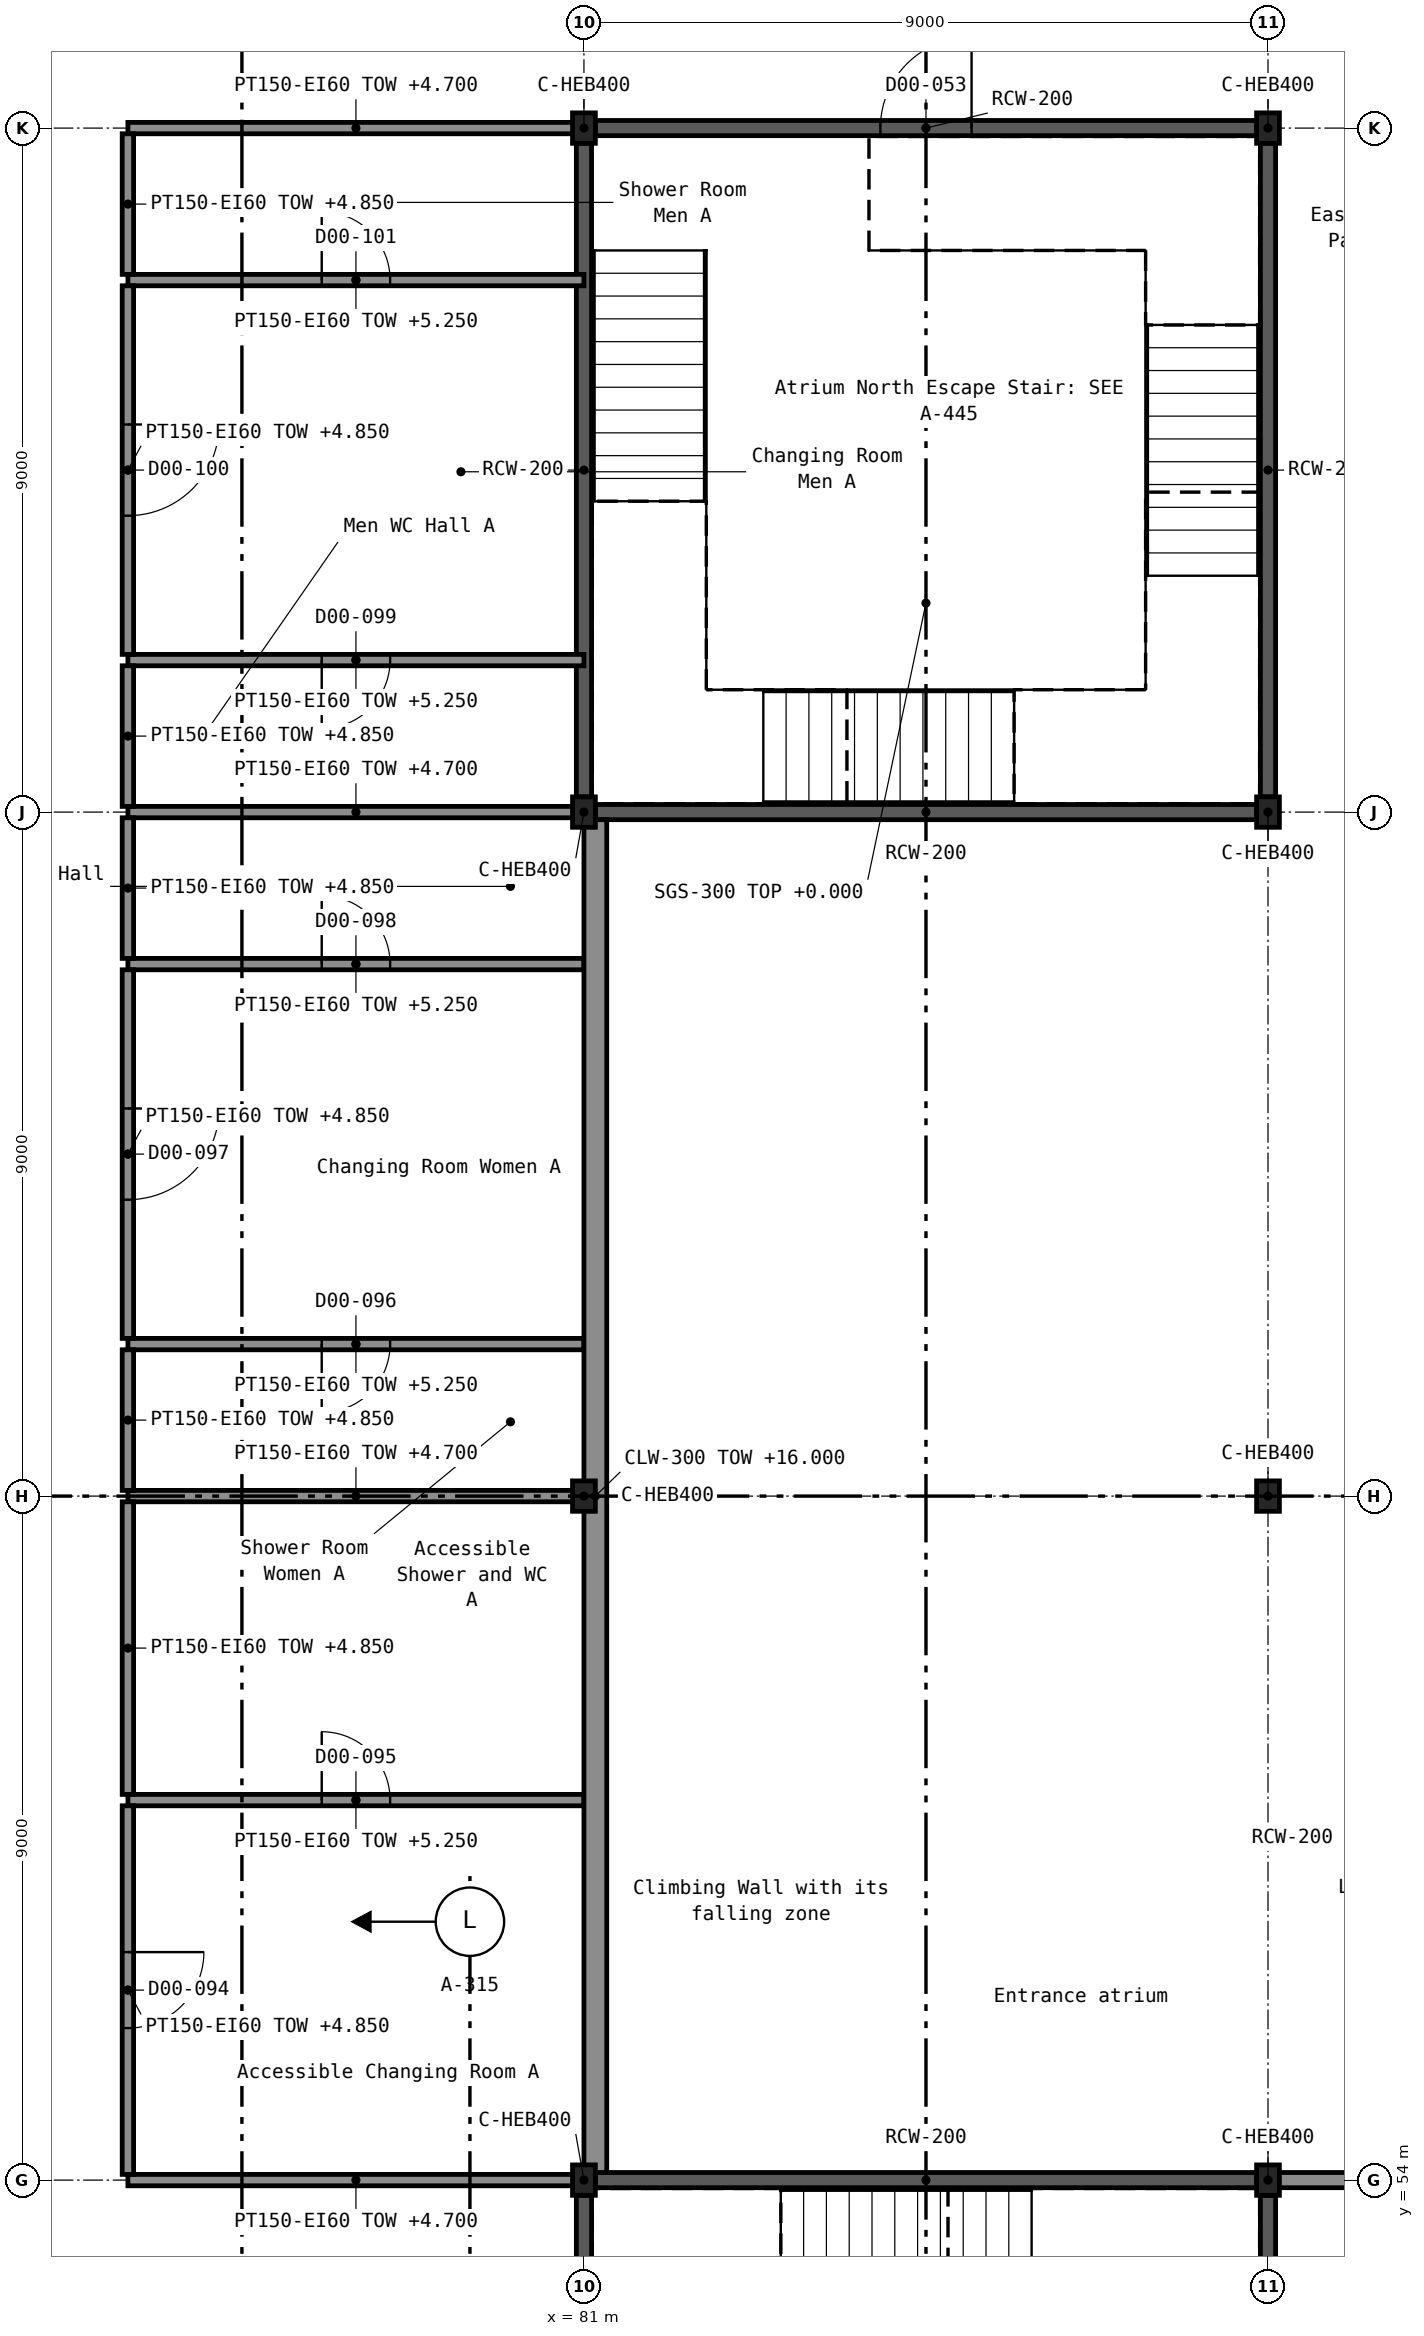
"""IFC4 building model, lengths in metres.
Left out: names, types, materials, properties, quantities, classifications, styles, units other than length and angle.
Written with IfcOpenShell. Run it as: python <this file> out.ifc"""

import sys

from ifc_helpers import new_model, si_unit, direction, frame, frame_2d, origin, origin_2d, place, context, subcontext, project, spatial, rectangle, i_section, extrude, element, fill, save


model = new_model("IFC4")
c1 = context("Model", 3, precision=1e-05, world=origin(), true_north=direction((0.0, 1.0)))
c2 = subcontext(c1, "Body", "Model", "MODEL_VIEW")
j1 = project(units=[si_unit("LENGTHUNIT", "METRE"), si_unit("PLANEANGLEUNIT", "RADIAN")], contexts=[c1])
p1 = place(None, origin())
s1 = spatial("IfcSite", under=j1, at=p1, CompositionType="ELEMENT")
p2 = place(p1, origin())
s2 = spatial("IfcBuilding", under=s1, at=p2, CompositionType="ELEMENT")
p3 = place(p2, origin())
s3 = spatial("IfcBuildingStorey", under=s2, at=p3, CompositionType="ELEMENT", Elevation=0.0)
for number, where, z_axis, x_axis in (
    (1, (81.0, 54.0, -0.3), (0.0, 0.0, 1.0), (1.0, 0.0, 0.0)),
    (2, (90.0, 54.0, -0.3), (0.0, 0.0, 1.0), (1.0, 0.0, 0.0)),
    (3, (81.0, 63.0, -0.3), (0.0, 0.0, 1.0), (1.0, 0.0, 0.0)),
    (4, (90.0, 63.0, -0.3), (0.0, 0.0, 1.0), (1.0, 0.0, 0.0)),
    (5, (81.0, 72.0, -0.3), (0.0, 0.0, 1.0), (1.0, 0.0, 0.0)),
    (6, (90.0, 72.0, -0.3), (0.0, 0.0, 1.0), (1.0, 0.0, 0.0)),
    (7, (81.0, 81.0, -0.3), (0.0, 0.0, 1.0), (1.0, 0.0, 0.0)),
    (8, (90.0, 81.0, -0.3), (0.0, 0.0, 1.0), (1.0, 0.0, 0.0)),
):
    element("IfcColumn", number, at=place(p3, frame(where, z_axis=z_axis, x_axis=x_axis)), inside=s3, PredefinedType="COLUMN", context=c2, shape_type="SweptSolid", body=[
        extrude(i_section(OverallWidth=0.3, OverallDepth=0.4, WebThickness=0.013, FlangeThickness=0.024, FilletRadius=0.027, at=origin_2d()), origin(), (0.0, 0.0, 1.0), 5.7),
    ])
p4 = place(p3, frame((81.15, 54.0, 0.0), z_axis=(0.0, 0.0, 1.0), x_axis=(1.0, 0.0, 0.0)))
e9 = element("IfcWall", 9, at=p4, inside=s3, PredefinedType="SHEAR", context=c2, shape_type="SweptSolid", body=[
    extrude(rectangle(XDim=8.7, YDim=0.2, at=frame_2d((4.35, 0.0))), origin(), (0.0, 0.0, 1.0), 5.4),
])
p5 = place(p3, frame((81.0, 45.2, 0.0), z_axis=(0.0, 0.0, 1.0), x_axis=(0.0, 1.0, 0.0)))
e10 = element("IfcWall", 10, at=p5, inside=s3, PredefinedType="SHEAR", context=c2, shape_type="SweptSolid", body=[
    extrude(rectangle(XDim=8.6, YDim=0.2, at=frame_2d((4.3, 0.0))), origin(), (0.0, 0.0, 1.0), 5.4),
])
p6 = place(p5, frame((3.7, 0.0, 0.0)))
e11 = element("IfcOpeningElement", 11, at=p6, cuts=e10, PredefinedType="OPENING", context=c2, shape_type="SweptSolid", body=[
    extrude(rectangle(XDim=1.2, YDim=2.1, at=frame_2d((0.6, 1.05))), frame((0.0, 0.111, 0.0), z_axis=(0.0, -1.0, 0.0), x_axis=(1.0, 0.0, 0.0)), (0.0, 0.0, 1.0), 0.222),
])
p7 = place(p3, frame((90.0, 45.2, 0.0), z_axis=(0.0, 0.0, 1.0), x_axis=(0.0, 1.0, 0.0)))
e12 = element("IfcWall", 12, at=p7, inside=s3, PredefinedType="SHEAR", context=c2, shape_type="SweptSolid", body=[
    extrude(rectangle(XDim=8.6, YDim=0.2, at=frame_2d((4.3, 0.0))), origin(), (0.0, 0.0, 1.0), 5.4),
])
p8 = place(p3, frame((81.15, 72.0, 0.0), z_axis=(0.0, 0.0, 1.0), x_axis=(1.0, 0.0, 0.0)))
e13 = element("IfcWall", 13, at=p8, inside=s3, PredefinedType="SHEAR", context=c2, shape_type="SweptSolid", body=[
    extrude(rectangle(XDim=8.7, YDim=0.2, at=frame_2d((4.35, 0.0))), origin(), (0.0, 0.0, 1.0), 5.4),
])
p9 = place(p3, frame((81.15, 81.0, 0.0), z_axis=(0.0, 0.0, 1.0), x_axis=(1.0, 0.0, 0.0)))
e14 = element("IfcWall", 14, at=p9, inside=s3, PredefinedType="SHEAR", context=c2, shape_type="SweptSolid", body=[
    extrude(rectangle(XDim=8.7, YDim=0.2, at=frame_2d((4.35, 0.0))), origin(), (0.0, 0.0, 1.0), 5.4),
])
p10 = place(p9, frame((3.75, 0.0, 0.0)))
e15 = element("IfcOpeningElement", 15, at=p10, cuts=e14, PredefinedType="OPENING", context=c2, shape_type="SweptSolid", body=[
    extrude(rectangle(XDim=1.2, YDim=2.1, at=frame_2d((0.6, 1.05))), frame((0.0, 0.111, 0.0), z_axis=(0.0, -1.0, 0.0), x_axis=(1.0, 0.0, 0.0)), (0.0, 0.0, 1.0), 0.222),
])
for number, where, z_axis, x_axis in (
    (16, (81.0, 72.2, 0.0), (0.0, 0.0, 1.0), (0.0, 1.0, 0.0)),
    (17, (90.0, 72.2, 0.0), (0.0, 0.0, 1.0), (0.0, 1.0, 0.0)),
):
    element("IfcWall", number, at=place(p3, frame(where, z_axis=z_axis, x_axis=x_axis)), inside=s3, PredefinedType="SHEAR", context=c2, shape_type="SweptSolid", body=[
        extrude(rectangle(XDim=8.6, YDim=0.2, at=frame_2d((4.3, 0.0))), origin(), (0.0, 0.0, 1.0), 5.4),
    ])
p11 = place(p3, frame((90.0, 54.0, 0.0), z_axis=(0.0, 0.0, 1.0), x_axis=(1.0, 0.0, 0.0)))
e18 = element("IfcWall", 18, at=p11, inside=s3, PredefinedType="SOLIDWALL", context=c2, shape_type="SweptSolid", body=[
    extrude(rectangle(XDim=5.4, YDim=0.2, at=frame_2d((2.7, 0.0))), origin(), (0.0, 0.0, 1.0), 4.7),
])
p12 = place(p3, frame((75.0, 54.0, 0.0), z_axis=(0.0, 0.0, 1.0), x_axis=(1.0, 0.0, 0.0)))
e19 = element("IfcWall", 19, at=p12, inside=s3, PredefinedType="PARTITIONING", context=c2, shape_type="SweptSolid", body=[
    extrude(rectangle(XDim=6.0, YDim=0.15, at=frame_2d((3.0, 0.0))), origin(), (0.0, 0.0, 1.0), 4.7),
])
p13 = place(p3, frame((75.0, 59.0, 0.0), z_axis=(0.0, 0.0, 1.0), x_axis=(1.0, 0.0, 0.0)))
e20 = element("IfcWall", 20, at=p13, inside=s3, PredefinedType="PARTITIONING", context=c2, shape_type="SweptSolid", body=[
    extrude(rectangle(XDim=6.0, YDim=0.15, at=frame_2d((3.0, 0.0))), origin(), (0.0, 0.0, 1.0), 5.25),
])
p14 = place(p13, frame((2.55, 0.0, 0.0)))
e21 = element("IfcOpeningElement", 21, at=p14, cuts=e20, PredefinedType="OPENING", context=c2, shape_type="SweptSolid", body=[
    extrude(rectangle(XDim=0.9, YDim=2.1, at=frame_2d((0.45, 1.05))), frame((0.0, 0.086, 0.0), z_axis=(0.0, -1.0, 0.0), x_axis=(1.0, 0.0, 0.0)), (0.0, 0.0, 1.0), 0.172),
])
p15 = place(p3, frame((75.0, 63.0, 0.0), z_axis=(0.0, 0.0, 1.0), x_axis=(1.0, 0.0, 0.0)))
e22 = element("IfcWall", 22, at=p15, inside=s3, PredefinedType="PARTITIONING", context=c2, shape_type="SweptSolid", body=[
    extrude(rectangle(XDim=6.0, YDim=0.15, at=frame_2d((3.0, 0.0))), origin(), (0.0, 0.0, 1.0), 4.7),
])
p16 = place(p3, frame((75.0, 65.0, 0.0), z_axis=(0.0, 0.0, 1.0), x_axis=(1.0, 0.0, 0.0)))
e23 = element("IfcWall", 23, at=p16, inside=s3, PredefinedType="PARTITIONING", context=c2, shape_type="SweptSolid", body=[
    extrude(rectangle(XDim=6.0, YDim=0.15, at=frame_2d((3.0, 0.0))), origin(), (0.0, 0.0, 1.0), 5.25),
])
p17 = place(p16, frame((2.55, 0.0, 0.0)))
e24 = element("IfcOpeningElement", 24, at=p17, cuts=e23, PredefinedType="OPENING", context=c2, shape_type="SweptSolid", body=[
    extrude(rectangle(XDim=0.9, YDim=2.1, at=frame_2d((0.45, 1.05))), frame((0.0, 0.086, 0.0), z_axis=(0.0, -1.0, 0.0), x_axis=(1.0, 0.0, 0.0)), (0.0, 0.0, 1.0), 0.172),
])
p18 = place(p3, frame((75.0, 70.0, 0.0), z_axis=(0.0, 0.0, 1.0), x_axis=(1.0, 0.0, 0.0)))
e25 = element("IfcWall", 25, at=p18, inside=s3, PredefinedType="PARTITIONING", context=c2, shape_type="SweptSolid", body=[
    extrude(rectangle(XDim=6.0, YDim=0.15, at=frame_2d((3.0, 0.0))), origin(), (0.0, 0.0, 1.0), 5.25),
])
p19 = place(p18, frame((2.55, 0.0, 0.0)))
e26 = element("IfcOpeningElement", 26, at=p19, cuts=e25, PredefinedType="OPENING", context=c2, shape_type="SweptSolid", body=[
    extrude(rectangle(XDim=0.9, YDim=2.1, at=frame_2d((0.45, 1.05))), frame((0.0, 0.086, 0.0), z_axis=(0.0, -1.0, 0.0), x_axis=(1.0, 0.0, 0.0)), (0.0, 0.0, 1.0), 0.172),
])
p20 = place(p3, frame((75.0, 72.0, 0.0), z_axis=(0.0, 0.0, 1.0), x_axis=(1.0, 0.0, 0.0)))
e27 = element("IfcWall", 27, at=p20, inside=s3, PredefinedType="PARTITIONING", context=c2, shape_type="SweptSolid", body=[
    extrude(rectangle(XDim=6.0, YDim=0.15, at=frame_2d((3.0, 0.0))), origin(), (0.0, 0.0, 1.0), 4.7),
])
p21 = place(p3, frame((75.0, 74.0, 0.0), z_axis=(0.0, 0.0, 1.0), x_axis=(1.0, 0.0, 0.0)))
e28 = element("IfcWall", 28, at=p21, inside=s3, PredefinedType="PARTITIONING", context=c2, shape_type="SweptSolid", body=[
    extrude(rectangle(XDim=6.0, YDim=0.15, at=frame_2d((3.0, 0.0))), origin(), (0.0, 0.0, 1.0), 5.25),
])
p22 = place(p21, frame((2.55, 0.0, 0.0)))
e29 = element("IfcOpeningElement", 29, at=p22, cuts=e28, PredefinedType="OPENING", context=c2, shape_type="SweptSolid", body=[
    extrude(rectangle(XDim=0.9, YDim=2.1, at=frame_2d((0.45, 1.05))), frame((0.0, 0.086, 0.0), z_axis=(0.0, -1.0, 0.0), x_axis=(1.0, 0.0, 0.0)), (0.0, 0.0, 1.0), 0.172),
])
p23 = place(p3, frame((75.0, 79.0, 0.0), z_axis=(0.0, 0.0, 1.0), x_axis=(1.0, 0.0, 0.0)))
e30 = element("IfcWall", 30, at=p23, inside=s3, PredefinedType="PARTITIONING", context=c2, shape_type="SweptSolid", body=[
    extrude(rectangle(XDim=6.0, YDim=0.15, at=frame_2d((3.0, 0.0))), origin(), (0.0, 0.0, 1.0), 5.25),
])
p24 = place(p23, frame((2.55, 0.0, 0.0)))
e31 = element("IfcOpeningElement", 31, at=p24, cuts=e30, PredefinedType="OPENING", context=c2, shape_type="SweptSolid", body=[
    extrude(rectangle(XDim=0.9, YDim=2.1, at=frame_2d((0.45, 1.05))), frame((0.0, 0.086, 0.0), z_axis=(0.0, -1.0, 0.0), x_axis=(1.0, 0.0, 0.0)), (0.0, 0.0, 1.0), 0.172),
])
p25 = place(p3, frame((75.0, 81.0, 0.0), z_axis=(0.0, 0.0, 1.0), x_axis=(1.0, 0.0, 0.0)))
e32 = element("IfcWall", 32, at=p25, inside=s3, PredefinedType="PARTITIONING", context=c2, shape_type="SweptSolid", body=[
    extrude(rectangle(XDim=6.0, YDim=0.15, at=frame_2d((3.0, 0.0))), origin(), (0.0, 0.0, 1.0), 4.7),
])
p26 = place(p3, frame((75.0, 54.075, 0.0), z_axis=(0.0, 0.0, 1.0), x_axis=(0.0, 1.0, 0.0)))
e33 = element("IfcWall", 33, at=p26, inside=s3, PredefinedType="PARTITIONING", context=c2, shape_type="SweptSolid", body=[
    extrude(rectangle(XDim=4.85, YDim=0.15, at=frame_2d((2.425, 0.0))), origin(), (0.0, 0.0, 1.0), 4.85),
])
p27 = place(p26, frame((1.925, 0.0, 0.0)))
e34 = element("IfcOpeningElement", 34, at=p27, cuts=e33, PredefinedType="OPENING", context=c2, shape_type="SweptSolid", body=[
    extrude(rectangle(XDim=1.0, YDim=2.1, at=frame_2d((0.5, 1.05))), frame((0.0, 0.086, 0.0), z_axis=(0.0, -1.0, 0.0), x_axis=(1.0, 0.0, 0.0)), (0.0, 0.0, 1.0), 0.172),
])
p28 = place(p3, frame((75.0, 59.075, 0.0), z_axis=(0.0, 0.0, 1.0), x_axis=(0.0, 1.0, 0.0)))
e35 = element("IfcWall", 35, at=p28, inside=s3, PredefinedType="PARTITIONING", context=c2, shape_type="SweptSolid", body=[
    extrude(rectangle(XDim=3.85, YDim=0.15, at=frame_2d((1.925, 0.0))), origin(), (0.0, 0.0, 1.0), 4.85),
])
p29 = place(p3, frame((75.0, 63.075, 0.0), z_axis=(0.0, 0.0, 1.0), x_axis=(0.0, 1.0, 0.0)))
e36 = element("IfcWall", 36, at=p29, inside=s3, PredefinedType="PARTITIONING", context=c2, shape_type="SweptSolid", body=[
    extrude(rectangle(XDim=1.85, YDim=0.15, at=frame_2d((0.925, 0.0))), origin(), (0.0, 0.0, 1.0), 4.85),
])
p30 = place(p3, frame((75.0, 65.075, 0.0), z_axis=(0.0, 0.0, 1.0), x_axis=(0.0, 1.0, 0.0)))
e37 = element("IfcWall", 37, at=p30, inside=s3, PredefinedType="PARTITIONING", context=c2, shape_type="SweptSolid", body=[
    extrude(rectangle(XDim=4.85, YDim=0.15, at=frame_2d((2.425, 0.0))), origin(), (0.0, 0.0, 1.0), 4.85),
])
p31 = place(p30, frame((1.825, 0.0, 0.0)))
e38 = element("IfcOpeningElement", 38, at=p31, cuts=e37, PredefinedType="OPENING", context=c2, shape_type="SweptSolid", body=[
    extrude(rectangle(XDim=1.2, YDim=2.1, at=frame_2d((0.6, 1.05))), frame((0.0, 0.086, 0.0), z_axis=(0.0, -1.0, 0.0), x_axis=(1.0, 0.0, 0.0)), (0.0, 0.0, 1.0), 0.172),
])
for number, where, z_axis, x_axis in (
    (39, (75.0, 70.075, 0.0), (0.0, 0.0, 1.0), (0.0, 1.0, 0.0)),
    (40, (75.0, 72.075, 0.0), (0.0, 0.0, 1.0), (0.0, 1.0, 0.0)),
):
    element("IfcWall", number, at=place(p3, frame(where, z_axis=z_axis, x_axis=x_axis)), inside=s3, PredefinedType="PARTITIONING", context=c2, shape_type="SweptSolid", body=[
        extrude(rectangle(XDim=1.85, YDim=0.15, at=frame_2d((0.925, 0.0))), origin(), (0.0, 0.0, 1.0), 4.85),
    ])
p32 = place(p3, frame((75.0, 74.075, 0.0), z_axis=(0.0, 0.0, 1.0), x_axis=(0.0, 1.0, 0.0)))
e41 = element("IfcWall", 41, at=p32, inside=s3, PredefinedType="PARTITIONING", context=c2, shape_type="SweptSolid", body=[
    extrude(rectangle(XDim=4.85, YDim=0.15, at=frame_2d((2.425, 0.0))), origin(), (0.0, 0.0, 1.0), 4.85),
])
p33 = place(p32, frame((1.825, 0.0, 0.0)))
e42 = element("IfcOpeningElement", 42, at=p33, cuts=e41, PredefinedType="OPENING", context=c2, shape_type="SweptSolid", body=[
    extrude(rectangle(XDim=1.2, YDim=2.1, at=frame_2d((0.6, 1.05))), frame((0.0, 0.086, 0.0), z_axis=(0.0, -1.0, 0.0), x_axis=(1.0, 0.0, 0.0)), (0.0, 0.0, 1.0), 0.172),
])
p34 = place(p3, frame((75.0, 79.075, 0.0), z_axis=(0.0, 0.0, 1.0), x_axis=(0.0, 1.0, 0.0)))
e43 = element("IfcWall", 43, at=p34, inside=s3, PredefinedType="PARTITIONING", context=c2, shape_type="SweptSolid", body=[
    extrude(rectangle(XDim=1.85, YDim=0.15, at=frame_2d((0.925, 0.0))), origin(), (0.0, 0.0, 1.0), 4.85),
])
p35 = place(p3, frame((81.15, 54.1, 0.0), z_axis=(0.0, 0.0, 1.0), x_axis=(0.0, 1.0, 0.0)))
e44 = element("IfcWall", 44, at=p35, inside=s3, PredefinedType="SOLIDWALL", context=c2, shape_type="SweptSolid", body=[
    extrude(rectangle(XDim=17.8, YDim=0.3, at=frame_2d((8.9, 0.0))), origin(), (0.0, 0.0, 1.0), 16.0),
])
p36 = place(p10, origin())
e45 = element("IfcDoor", 45, at=p36, inside=s3, OperationType="SINGLE_SWING_RIGHT", PredefinedType="DOOR", context=c2, shape_type="SweptSolid", body=[
    extrude(rectangle(XDim=1.2, YDim=2.1, at=frame_2d((0.6, 1.05))), frame((0.0, 0.025, 0.0), z_axis=(0.0, -1.0, 0.0), x_axis=(1.0, 0.0, 0.0)), (0.0, 0.0, 1.0), 0.05),
])
fill(e15, e45)
p37 = place(p27, frame((1.0, 0.0, 0.0), z_axis=(0.0, 0.0, 1.0), x_axis=(-1.0, 0.0, 0.0)))
e46 = element("IfcDoor", 46, at=p37, inside=s3, OperationType="SINGLE_SWING_LEFT", PredefinedType="DOOR", context=c2, shape_type="SweptSolid", body=[
    extrude(rectangle(XDim=1.0, YDim=2.1, at=frame_2d((0.5, 1.05))), frame((0.0, 0.025, 0.0), z_axis=(0.0, -1.0, 0.0), x_axis=(1.0, 0.0, 0.0)), (0.0, 0.0, 1.0), 0.05),
])
fill(e34, e46)
p38 = place(p14, origin())
e47 = element("IfcDoor", 47, at=p38, inside=s3, OperationType="SINGLE_SWING_LEFT", PredefinedType="DOOR", context=c2, shape_type="SweptSolid", body=[
    extrude(rectangle(XDim=0.9, YDim=2.1, at=frame_2d((0.45, 1.05))), frame((0.0, 0.025, 0.0), z_axis=(0.0, -1.0, 0.0), x_axis=(1.0, 0.0, 0.0)), (0.0, 0.0, 1.0), 0.05),
])
fill(e21, e47)
p39 = place(p17, frame((0.9, 0.0, 0.0), z_axis=(0.0, 0.0, 1.0), x_axis=(-1.0, 0.0, 0.0)))
e48 = element("IfcDoor", 48, at=p39, inside=s3, OperationType="SINGLE_SWING_RIGHT", PredefinedType="DOOR", context=c2, shape_type="SweptSolid", body=[
    extrude(rectangle(XDim=0.9, YDim=2.1, at=frame_2d((0.45, 1.05))), frame((0.0, 0.025, 0.0), z_axis=(0.0, -1.0, 0.0), x_axis=(1.0, 0.0, 0.0)), (0.0, 0.0, 1.0), 0.05),
])
fill(e24, e48)
p40 = place(p31, frame((1.2, 0.0, 0.0), z_axis=(0.0, 0.0, 1.0), x_axis=(-1.0, 0.0, 0.0)))
e49 = element("IfcDoor", 49, at=p40, inside=s3, OperationType="SINGLE_SWING_LEFT", PredefinedType="DOOR", context=c2, shape_type="SweptSolid", body=[
    extrude(rectangle(XDim=1.2, YDim=2.1, at=frame_2d((0.6, 1.05))), frame((0.0, 0.025, 0.0), z_axis=(0.0, -1.0, 0.0), x_axis=(1.0, 0.0, 0.0)), (0.0, 0.0, 1.0), 0.05),
])
fill(e38, e49)
p41 = place(p19, origin())
e50 = element("IfcDoor", 50, at=p41, inside=s3, OperationType="SINGLE_SWING_LEFT", PredefinedType="DOOR", context=c2, shape_type="SweptSolid", body=[
    extrude(rectangle(XDim=0.9, YDim=2.1, at=frame_2d((0.45, 1.05))), frame((0.0, 0.025, 0.0), z_axis=(0.0, -1.0, 0.0), x_axis=(1.0, 0.0, 0.0)), (0.0, 0.0, 1.0), 0.05),
])
fill(e26, e50)
p42 = place(p22, frame((0.9, 0.0, 0.0), z_axis=(0.0, 0.0, 1.0), x_axis=(-1.0, 0.0, 0.0)))
e51 = element("IfcDoor", 51, at=p42, inside=s3, OperationType="SINGLE_SWING_RIGHT", PredefinedType="DOOR", context=c2, shape_type="SweptSolid", body=[
    extrude(rectangle(XDim=0.9, YDim=2.1, at=frame_2d((0.45, 1.05))), frame((0.0, 0.025, 0.0), z_axis=(0.0, -1.0, 0.0), x_axis=(1.0, 0.0, 0.0)), (0.0, 0.0, 1.0), 0.05),
])
fill(e29, e51)
p43 = place(p33, frame((1.2, 0.0, 0.0), z_axis=(0.0, 0.0, 1.0), x_axis=(-1.0, 0.0, 0.0)))
e52 = element("IfcDoor", 52, at=p43, inside=s3, OperationType="SINGLE_SWING_LEFT", PredefinedType="DOOR", context=c2, shape_type="SweptSolid", body=[
    extrude(rectangle(XDim=1.2, YDim=2.1, at=frame_2d((0.6, 1.05))), frame((0.0, 0.025, 0.0), z_axis=(0.0, -1.0, 0.0), x_axis=(1.0, 0.0, 0.0)), (0.0, 0.0, 1.0), 0.05),
])
fill(e42, e52)
p44 = place(p24, origin())
e53 = element("IfcDoor", 53, at=p44, inside=s3, OperationType="SINGLE_SWING_LEFT", PredefinedType="DOOR", context=c2, shape_type="SweptSolid", body=[
    extrude(rectangle(XDim=0.9, YDim=2.1, at=frame_2d((0.45, 1.05))), frame((0.0, 0.025, 0.0), z_axis=(0.0, -1.0, 0.0), x_axis=(1.0, 0.0, 0.0)), (0.0, 0.0, 1.0), 0.05),
])
fill(e31, e53)
save(model, sys.argv[1])
